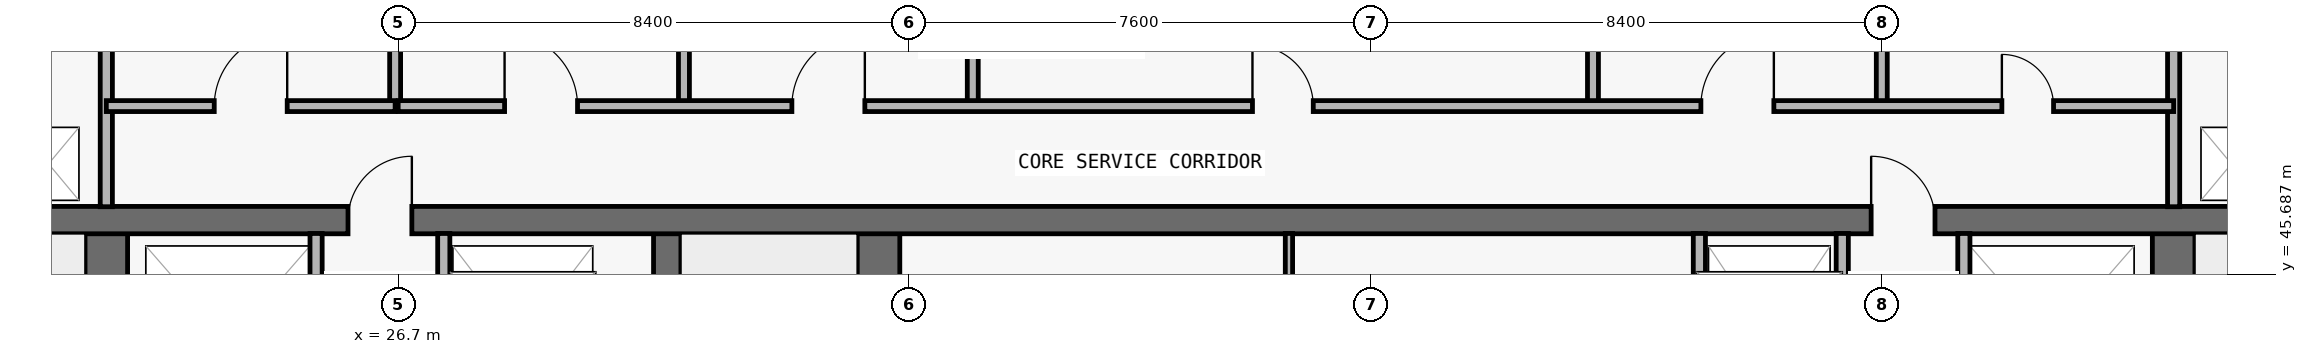
"""IFC4 building model, lengths in metres.
Left out: names, types, materials, properties, quantities, classifications, styles, units other than length and angle.
Written with IfcOpenShell. Run it as: python <this file> out.ifc"""

import sys

from ifc_helpers import new_model, si_unit, direction, frame, frame_2d, origin, place, context, subcontext, project, spatial, rectangle, extrude, element, fill, save


model = new_model("IFC4")
c1 = context("Model", 3, precision=1e-05, world=origin(), true_north=direction((0.0, 1.0)))
c2 = subcontext(c1, "Body", "Model", "MODEL_VIEW")
j1 = project(units=[si_unit("LENGTHUNIT", "METRE"), si_unit("PLANEANGLEUNIT", "RADIAN")], contexts=[c1])
p1 = place(None, origin())
s1 = spatial("IfcSite", under=j1, at=p1, CompositionType="ELEMENT")
p2 = place(p1, origin())
s2 = spatial("IfcBuilding", under=s1, at=p2, CompositionType="ELEMENT")
p3 = place(p2, frame((0.0, 0.0, 249.6)))
s3 = spatial("IfcBuildingStorey", under=s2, at=p3, CompositionType="ELEMENT", Elevation=249.6)
p4 = place(p3, frame((21.9, 37.0, 0.0), z_axis=(0.0, 0.0, 1.0), x_axis=(0.0, 1.0, 0.0)))
e1 = element("IfcWall", 1, at=p4, inside=s3, PredefinedType="SHEAR", context=c2, shape_type="SweptSolid", body=[
    extrude(rectangle(XDim=9.575, YDim=0.7, at=frame_2d((4.788, 0.0))), origin(), (0.0, 0.0, 1.0), 3.05),
])
p5 = place(p4, frame((0.55, 0.0, 0.0)))
e2 = element("IfcOpeningElement", 2, at=p5, cuts=e1, PredefinedType="OPENING", context=c2, shape_type="SweptSolid", body=[
    extrude(rectangle(XDim=1.1, YDim=2.15, at=frame_2d((0.55, 1.075))), frame((0.0, 0.36, 0.0), z_axis=(0.0, -1.0, 0.0), x_axis=(1.0, 0.0, 0.0)), (0.0, 0.0, 1.0), 0.72),
])
p6 = place(p3, frame((55.9, 37.0, 0.0), z_axis=(0.0, 0.0, 1.0), x_axis=(0.0, 1.0, 0.0)))
e3 = element("IfcWall", 3, at=p6, inside=s3, PredefinedType="SHEAR", context=c2, shape_type="SweptSolid", body=[
    extrude(rectangle(XDim=9.575, YDim=0.7, at=frame_2d((4.788, 0.0))), origin(), (0.0, 0.0, 1.0), 3.05),
])
p7 = place(p6, frame((0.55, 0.0, 0.0)))
e4 = element("IfcOpeningElement", 4, at=p7, cuts=e3, PredefinedType="OPENING", context=c2, shape_type="SweptSolid", body=[
    extrude(rectangle(XDim=1.1, YDim=2.15, at=frame_2d((0.55, 1.075))), frame((0.0, 0.36, 0.0), z_axis=(0.0, -1.0, 0.0), x_axis=(1.0, 0.0, 0.0)), (0.0, 0.0, 1.0), 0.72),
])
p8 = place(p3, frame((31.125, 37.0, 0.0), z_axis=(0.0, 0.0, 1.0), x_axis=(0.0, 1.0, 0.0)))
e5 = element("IfcWall", 5, at=p8, inside=s3, PredefinedType="SHEAR", context=c2, shape_type="SweptSolid", body=[
    extrude(rectangle(XDim=9.575, YDim=0.45, at=frame_2d((4.788, 0.0))), origin(), (0.0, 0.0, 1.0), 3.05),
])
p9 = place(p3, frame((34.6, 37.0, 0.0), z_axis=(0.0, 0.0, 1.0), x_axis=(0.0, 1.0, 0.0)))
e6 = element("IfcWall", 6, at=p9, inside=s3, PredefinedType="SHEAR", context=c2, shape_type="SweptSolid", body=[
    extrude(rectangle(XDim=9.575, YDim=0.7, at=frame_2d((4.788, 0.0))), origin(), (0.0, 0.0, 1.0), 3.05),
])
p10 = place(p3, frame((18.3, 46.575, 0.0), z_axis=(0.0, 0.0, 1.0), x_axis=(1.0, 0.0, 0.0)))
e7 = element("IfcWall", 7, at=p10, inside=s3, PredefinedType="SHEAR", context=c2, shape_type="SweptSolid", body=[
    extrude(rectangle(XDim=41.2, YDim=0.45, at=frame_2d((20.6, 0.0))), origin(), (0.0, 0.0, 1.0), 3.05),
])
p11 = place(p10, frame((7.575, 0.0, 0.0)))
e8 = element("IfcOpeningElement", 8, at=p11, cuts=e7, PredefinedType="OPENING", context=c2, shape_type="SweptSolid", body=[
    extrude(rectangle(XDim=1.05, YDim=2.15, at=frame_2d((0.525, 1.075))), frame((0.0, 0.235, 0.0), z_axis=(0.0, -1.0, 0.0), x_axis=(1.0, 0.0, 0.0)), (0.0, 0.0, 1.0), 0.47),
])
p12 = place(p10, frame((32.625, 0.0, 0.0)))
e9 = element("IfcOpeningElement", 9, at=p12, cuts=e7, PredefinedType="OPENING", context=c2, shape_type="SweptSolid", body=[
    extrude(rectangle(XDim=1.05, YDim=2.15, at=frame_2d((0.525, 1.075))), frame((0.0, 0.235, 0.0), z_axis=(0.0, -1.0, 0.0), x_axis=(1.0, 0.0, 0.0)), (0.0, 0.0, 1.0), 0.47),
])
p13 = place(p3, frame((21.9, 46.795, 0.0), z_axis=(0.0, 0.0, 1.0), x_axis=(0.0, 1.0, 0.0)))
e10 = element("IfcWall", 10, at=p13, inside=s3, PredefinedType="PARTITIONING", context=c2, shape_type="SweptSolid", body=[
    extrude(rectangle(XDim=3.16, YDim=0.2, at=frame_2d((1.58, 0.0))), origin(), (0.0, 0.0, 1.0), 3.05),
])
p14 = place(p3, frame((25.35, 43.17, 0.0), z_axis=(0.0, 0.0, 1.0), x_axis=(0.0, 1.0, 0.0)))
e11 = element("IfcWall", 11, at=p14, inside=s3, PredefinedType="PARTITIONING", context=c2, shape_type="SweptSolid", body=[
    extrude(rectangle(XDim=3.185, YDim=0.2, at=frame_2d((1.593, 0.0))), origin(), (0.0, 0.0, 1.0), 3.05),
])
p15 = place(p3, frame((26.65, 48.45, 0.0), z_axis=(0.0, 0.0, 1.0), x_axis=(0.0, 1.0, 0.0)))
e12 = element("IfcWall", 12, at=p15, inside=s3, PredefinedType="PARTITIONING", context=c2, shape_type="SweptSolid", body=[
    extrude(rectangle(XDim=1.505, YDim=0.18, at=frame_2d((0.752, 0.0))), origin(), (0.0, 0.0, 1.0), 3.05),
])
p16 = place(p3, frame((27.45, 43.17, 0.0), z_axis=(0.0, 0.0, 1.0), x_axis=(0.0, 1.0, 0.0)))
e13 = element("IfcWall", 13, at=p16, inside=s3, PredefinedType="PARTITIONING", context=c2, shape_type="SweptSolid", body=[
    extrude(rectangle(XDim=3.185, YDim=0.2, at=frame_2d((1.593, 0.0))), origin(), (0.0, 0.0, 1.0), 3.05),
])
for number, where, z_axis, x_axis in (
    (14, (31.4, 48.45, 0.0), (0.0, 0.0, 1.0), (0.0, 1.0, 0.0)),
    (15, (36.15, 48.45, 0.0), (0.0, 0.0, 1.0), (0.0, 1.0, 0.0)),
):
    element("IfcWall", number, at=place(p3, frame(where, z_axis=z_axis, x_axis=x_axis)), inside=s3, PredefinedType="PARTITIONING", context=c2, shape_type="SweptSolid", body=[
        extrude(rectangle(XDim=1.505, YDim=0.18, at=frame_2d((0.752, 0.0))), origin(), (0.0, 0.0, 1.0), 3.05),
    ])
p17 = place(p3, frame((41.35, 43.17, 0.0), z_axis=(0.0, 0.0, 1.0), x_axis=(0.0, 1.0, 0.0)))
e16 = element("IfcWall", 16, at=p17, inside=s3, PredefinedType="PARTITIONING", context=c2, shape_type="SweptSolid", body=[
    extrude(rectangle(XDim=3.185, YDim=0.12, at=frame_2d((1.593, 0.0))), origin(), (0.0, 0.0, 1.0), 3.05),
])
p18 = place(p3, frame((46.35, 48.45, 0.0), z_axis=(0.0, 0.0, 1.0), x_axis=(0.0, 1.0, 0.0)))
e17 = element("IfcWall", 17, at=p18, inside=s3, PredefinedType="PARTITIONING", context=c2, shape_type="SweptSolid", body=[
    extrude(rectangle(XDim=1.505, YDim=0.18, at=frame_2d((0.752, 0.0))), origin(), (0.0, 0.0, 1.0), 3.05),
])
for number, where, z_axis, x_axis in (
    (18, (48.1, 43.17, 0.0), (0.0, 0.0, 1.0), (0.0, 1.0, 0.0)),
    (19, (50.45, 43.17, 0.0), (0.0, 0.0, 1.0), (0.0, 1.0, 0.0)),
):
    element("IfcWall", number, at=place(p3, frame(where, z_axis=z_axis, x_axis=x_axis)), inside=s3, PredefinedType="PARTITIONING", context=c2, shape_type="SweptSolid", body=[
        extrude(rectangle(XDim=3.185, YDim=0.2, at=frame_2d((1.593, 0.0))), origin(), (0.0, 0.0, 1.0), 3.05),
    ])
p19 = place(p3, frame((51.1, 48.45, 0.0), z_axis=(0.0, 0.0, 1.0), x_axis=(0.0, 1.0, 0.0)))
e20 = element("IfcWall", 20, at=p19, inside=s3, PredefinedType="PARTITIONING", context=c2, shape_type="SweptSolid", body=[
    extrude(rectangle(XDim=1.505, YDim=0.18, at=frame_2d((0.752, 0.0))), origin(), (0.0, 0.0, 1.0), 3.05),
])
p20 = place(p3, frame((52.45, 43.17, 0.0), z_axis=(0.0, 0.0, 1.0), x_axis=(0.0, 1.0, 0.0)))
e21 = element("IfcWall", 21, at=p20, inside=s3, PredefinedType="PARTITIONING", context=c2, shape_type="SweptSolid", body=[
    extrude(rectangle(XDim=3.185, YDim=0.2, at=frame_2d((1.593, 0.0))), origin(), (0.0, 0.0, 1.0), 3.05),
])
p21 = place(p3, frame((55.9, 46.795, 0.0), z_axis=(0.0, 0.0, 1.0), x_axis=(0.0, 1.0, 0.0)))
e22 = element("IfcWall", 22, at=p21, inside=s3, PredefinedType="PARTITIONING", context=c2, shape_type="SweptSolid", body=[
    extrude(rectangle(XDim=3.16, YDim=0.2, at=frame_2d((1.58, 0.0))), origin(), (0.0, 0.0, 1.0), 3.05),
])
p22 = place(p3, frame((21.9, 48.45, 0.0), z_axis=(0.0, 0.0, 1.0), x_axis=(1.0, 0.0, 0.0)))
e23 = element("IfcWall", 23, at=p22, inside=s3, PredefinedType="PARTITIONING", context=c2, shape_type="SweptSolid", body=[
    extrude(rectangle(XDim=4.75, YDim=0.18, at=frame_2d((2.375, 0.0))), origin(), (0.0, 0.0, 1.0), 3.05),
])
p23 = place(p22, frame((1.775, 0.0, 0.0)))
e24 = element("IfcOpeningElement", 24, at=p23, cuts=e23, PredefinedType="OPENING", context=c2, shape_type="SweptSolid", body=[
    extrude(rectangle(XDim=1.2, YDim=2.2, at=frame_2d((0.6, 1.1))), frame((0.0, 0.1, 0.0), z_axis=(0.0, -1.0, 0.0), x_axis=(1.0, 0.0, 0.0)), (0.0, 0.0, 1.0), 0.2),
])
p24 = place(p3, frame((26.7, 48.45, 0.0), z_axis=(0.0, 0.0, 1.0), x_axis=(1.0, 0.0, 0.0)))
e25 = element("IfcWall", 25, at=p24, inside=s3, PredefinedType="PARTITIONING", context=c2, shape_type="SweptSolid", body=[
    extrude(rectangle(XDim=29.2, YDim=0.18, at=frame_2d((14.6, 0.0))), origin(), (0.0, 0.0, 1.0), 3.05),
])
p25 = place(p24, frame((1.75, 0.0, 0.0)))
e26 = element("IfcOpeningElement", 26, at=p25, cuts=e25, PredefinedType="OPENING", context=c2, shape_type="SweptSolid", body=[
    extrude(rectangle(XDim=1.2, YDim=2.2, at=frame_2d((0.6, 1.1))), frame((0.0, 0.1, 0.0), z_axis=(0.0, -1.0, 0.0), x_axis=(1.0, 0.0, 0.0)), (0.0, 0.0, 1.0), 0.2),
])
p26 = place(p24, frame((6.475, 0.0, 0.0)))
e27 = element("IfcOpeningElement", 27, at=p26, cuts=e25, PredefinedType="OPENING", context=c2, shape_type="SweptSolid", body=[
    extrude(rectangle(XDim=1.2, YDim=2.2, at=frame_2d((0.6, 1.1))), frame((0.0, 0.1, 0.0), z_axis=(0.0, -1.0, 0.0), x_axis=(1.0, 0.0, 0.0)), (0.0, 0.0, 1.0), 0.2),
])
p27 = place(p24, frame((14.05, 0.0, 0.0)))
e28 = element("IfcOpeningElement", 28, at=p27, cuts=e25, PredefinedType="OPENING", context=c2, shape_type="SweptSolid", body=[
    extrude(rectangle(XDim=1.0, YDim=2.2, at=frame_2d((0.5, 1.1))), frame((0.0, 0.1, 0.0), z_axis=(0.0, -1.0, 0.0), x_axis=(1.0, 0.0, 0.0)), (0.0, 0.0, 1.0), 0.2),
])
p28 = place(p24, frame((21.425, 0.0, 0.0)))
e29 = element("IfcOpeningElement", 29, at=p28, cuts=e25, PredefinedType="OPENING", context=c2, shape_type="SweptSolid", body=[
    extrude(rectangle(XDim=1.2, YDim=2.2, at=frame_2d((0.6, 1.1))), frame((0.0, 0.1, 0.0), z_axis=(0.0, -1.0, 0.0), x_axis=(1.0, 0.0, 0.0)), (0.0, 0.0, 1.0), 0.2),
])
p29 = place(p24, frame((26.375, 0.0, 0.0)))
e30 = element("IfcOpeningElement", 30, at=p29, cuts=e25, PredefinedType="OPENING", context=c2, shape_type="SweptSolid", body=[
    extrude(rectangle(XDim=0.85, YDim=2.1, at=frame_2d((0.425, 1.05))), frame((0.0, 0.1, 0.0), z_axis=(0.0, -1.0, 0.0), x_axis=(1.0, 0.0, 0.0)), (0.0, 0.0, 1.0), 0.2),
])
p30 = place(p11, origin())
e31 = element("IfcDoor", 31, at=p30, inside=s3, OperationType="SINGLE_SWING_RIGHT", PredefinedType="DOOR", context=c2, shape_type="SweptSolid", body=[
    extrude(rectangle(XDim=1.05, YDim=2.15, at=frame_2d((0.525, 1.075))), frame((0.0, 0.025, 0.0), z_axis=(0.0, -1.0, 0.0), x_axis=(1.0, 0.0, 0.0)), (0.0, 0.0, 1.0), 0.05),
])
fill(e8, e31)
p31 = place(p12, origin())
e32 = element("IfcDoor", 32, at=p31, inside=s3, OperationType="SINGLE_SWING_LEFT", PredefinedType="DOOR", context=c2, shape_type="SweptSolid", body=[
    extrude(rectangle(XDim=1.05, YDim=2.15, at=frame_2d((0.525, 1.075))), frame((0.0, 0.025, 0.0), z_axis=(0.0, -1.0, 0.0), x_axis=(1.0, 0.0, 0.0)), (0.0, 0.0, 1.0), 0.05),
])
fill(e9, e32)
p32 = place(p23, origin())
e33 = element("IfcDoor", 33, at=p32, inside=s3, OperationType="SINGLE_SWING_RIGHT", PredefinedType="DOOR", context=c2, shape_type="SweptSolid", body=[
    extrude(rectangle(XDim=1.2, YDim=2.2, at=frame_2d((0.6, 1.1))), frame((0.0, 0.025, 0.0), z_axis=(0.0, -1.0, 0.0), x_axis=(1.0, 0.0, 0.0)), (0.0, 0.0, 1.0), 0.05),
])
fill(e24, e33)
p33 = place(p25, origin())
e34 = element("IfcDoor", 34, at=p33, inside=s3, OperationType="SINGLE_SWING_LEFT", PredefinedType="DOOR", context=c2, shape_type="SweptSolid", body=[
    extrude(rectangle(XDim=1.2, YDim=2.2, at=frame_2d((0.6, 1.1))), frame((0.0, 0.025, 0.0), z_axis=(0.0, -1.0, 0.0), x_axis=(1.0, 0.0, 0.0)), (0.0, 0.0, 1.0), 0.05),
])
fill(e26, e34)
p34 = place(p26, origin())
e35 = element("IfcDoor", 35, at=p34, inside=s3, OperationType="SINGLE_SWING_RIGHT", PredefinedType="DOOR", context=c2, shape_type="SweptSolid", body=[
    extrude(rectangle(XDim=1.2, YDim=2.2, at=frame_2d((0.6, 1.1))), frame((0.0, 0.025, 0.0), z_axis=(0.0, -1.0, 0.0), x_axis=(1.0, 0.0, 0.0)), (0.0, 0.0, 1.0), 0.05),
])
fill(e27, e35)
p35 = place(p27, origin())
e36 = element("IfcDoor", 36, at=p35, inside=s3, OperationType="SINGLE_SWING_LEFT", PredefinedType="DOOR", context=c2, shape_type="SweptSolid", body=[
    extrude(rectangle(XDim=1.0, YDim=2.2, at=frame_2d((0.5, 1.1))), frame((0.0, 0.025, 0.0), z_axis=(0.0, -1.0, 0.0), x_axis=(1.0, 0.0, 0.0)), (0.0, 0.0, 1.0), 0.05),
])
fill(e28, e36)
p36 = place(p28, origin())
e37 = element("IfcDoor", 37, at=p36, inside=s3, OperationType="SINGLE_SWING_RIGHT", PredefinedType="DOOR", context=c2, shape_type="SweptSolid", body=[
    extrude(rectangle(XDim=1.2, YDim=2.2, at=frame_2d((0.6, 1.1))), frame((0.0, 0.025, 0.0), z_axis=(0.0, -1.0, 0.0), x_axis=(1.0, 0.0, 0.0)), (0.0, 0.0, 1.0), 0.05),
])
fill(e29, e37)
p37 = place(p29, origin())
e38 = element("IfcDoor", 38, at=p37, inside=s3, OperationType="SINGLE_SWING_LEFT", PredefinedType="DOOR", context=c2, shape_type="SweptSolid", body=[
    extrude(rectangle(XDim=0.85, YDim=2.1, at=frame_2d((0.425, 1.05))), frame((0.0, 0.025, 0.0), z_axis=(0.0, -1.0, 0.0), x_axis=(1.0, 0.0, 0.0)), (0.0, 0.0, 1.0), 0.05),
])
fill(e30, e38)
save(model, sys.argv[1])
